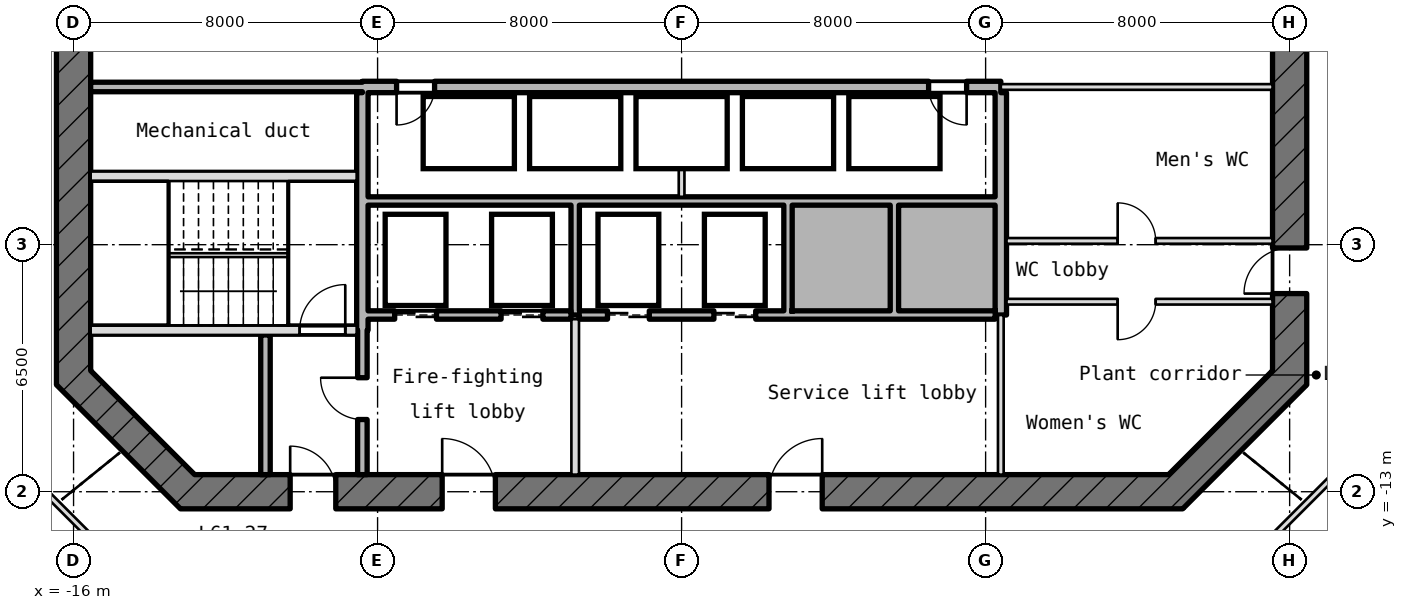
"""IFC4 building model, lengths in metres.
Left out: names, types, materials, properties, quantities, classifications, styles, units other than length and angle.
Written with IfcOpenShell. Run it as: python <this file> out.ifc"""

import sys

from ifc_helpers import new_model, si_unit, direction, frame, frame_2d, origin, place, context, subcontext, project, spatial, rectangle, extrude, element, fill, save


model = new_model("IFC4")
c1 = context("Model", 3, precision=1e-05, world=origin(), true_north=direction((0.0, 1.0)))
c2 = subcontext(c1, "Body", "Model", "MODEL_VIEW")
j1 = project(units=[si_unit("LENGTHUNIT", "METRE"), si_unit("PLANEANGLEUNIT", "RADIAN")], contexts=[c1])
p1 = place(None, origin())
s1 = spatial("IfcSite", under=j1, at=p1, CompositionType="ELEMENT")
p2 = place(p1, origin())
s2 = spatial("IfcBuilding", under=s1, at=p2, CompositionType="ELEMENT")
p3 = place(p2, frame((0.0, 0.0, 273.1)))
s3 = spatial("IfcBuildingStorey", under=s2, at=p3, CompositionType="ELEMENT", Elevation=273.1)
p4 = place(p3, frame((12.868, -13.132, -0.3), z_axis=(0.0, 0.0, 1.0), x_axis=(0.707106781187, 0.707106781187, 0.0)))
e1 = element("IfcWall", 1, at=p4, inside=s3, PredefinedType="SHEAR", context=c2, shape_type="SweptSolid", body=[
    extrude(rectangle(XDim=4.615, YDim=0.9, at=frame_2d((2.308, 0.0))), origin(), (0.0, 0.0, 1.0), 6.05),
])
p5 = place(p3, frame((16.0, -10.186, -0.3), z_axis=(0.0, 0.0, 1.0), x_axis=(0.0, 1.0, 0.0)))
e2 = element("IfcWall", 2, at=p5, inside=s3, PredefinedType="SHEAR", context=c2, shape_type="SweptSolid", body=[
    extrude(rectangle(XDim=20.373, YDim=0.9, at=frame_2d((10.186, 0.0))), origin(), (0.0, 0.0, 1.0), 6.05),
])
p6 = place(p5, frame((8.986, 0.0, 0.3)))
e3 = element("IfcOpeningElement", 3, at=p6, cuts=e2, PredefinedType="OPENING", context=c2, shape_type="SweptSolid", body=[
    extrude(rectangle(XDim=2.4, YDim=2.1, at=frame_2d((1.2, 1.05))), frame((0.0, 0.46, 0.0), z_axis=(0.0, -1.0, 0.0), x_axis=(1.0, 0.0, 0.0)), (0.0, 0.0, 1.0), 0.92),
])
p7 = place(p5, frame((13.586, 0.0, 0.3)))
e4 = element("IfcOpeningElement", 4, at=p7, cuts=e2, PredefinedType="OPENING", context=c2, shape_type="SweptSolid", body=[
    extrude(rectangle(XDim=1.2, YDim=2.1, at=frame_2d((0.6, 1.05))), frame((0.0, 0.46, 0.0), z_axis=(0.0, -1.0, 0.0), x_axis=(1.0, 0.0, 0.0)), (0.0, 0.0, 1.0), 0.92),
])
p8 = place(p5, frame((2.4, 0.0, 0.3)))
e5 = element("IfcOpeningElement", 5, at=p8, cuts=e2, PredefinedType="OPENING", context=c2, shape_type="SweptSolid", body=[
    extrude(rectangle(XDim=1.2, YDim=2.1, at=frame_2d((0.6, 1.05))), frame((0.0, 0.46, 0.0), z_axis=(0.0, -1.0, 0.0), x_axis=(1.0, 0.0, 0.0)), (0.0, 0.0, 1.0), 0.92),
])
p9 = place(p3, frame((-16.0, 10.186, -0.3), z_axis=(0.0, 0.0, 1.0), x_axis=(0.0, -1.0, 0.0)))
e6 = element("IfcWall", 6, at=p9, inside=s3, PredefinedType="SHEAR", context=c2, shape_type="SweptSolid", body=[
    extrude(rectangle(XDim=20.373, YDim=0.9, at=frame_2d((10.186, 0.0))), origin(), (0.0, 0.0, 1.0), 6.05),
])
p10 = place(p9, frame((8.986, 0.0, 0.3)))
e7 = element("IfcOpeningElement", 7, at=p10, cuts=e6, PredefinedType="OPENING", context=c2, shape_type="SweptSolid", body=[
    extrude(rectangle(XDim=2.4, YDim=2.1, at=frame_2d((1.2, 1.05))), frame((0.0, 0.46, 0.0), z_axis=(0.0, -1.0, 0.0), x_axis=(1.0, 0.0, 0.0)), (0.0, 0.0, 1.0), 0.92),
])
p11 = place(p9, frame((5.586, 0.0, 0.3)))
e8 = element("IfcOpeningElement", 8, at=p11, cuts=e6, PredefinedType="OPENING", context=c2, shape_type="SweptSolid", body=[
    extrude(rectangle(XDim=1.2, YDim=2.1, at=frame_2d((0.6, 1.05))), frame((0.0, 0.46, 0.0), z_axis=(0.0, -1.0, 0.0), x_axis=(1.0, 0.0, 0.0)), (0.0, 0.0, 1.0), 0.92),
])
p12 = place(p3, frame((-16.132, -9.868, -0.3), z_axis=(0.0, 0.0, 1.0), x_axis=(0.707106781187, -0.707106781187, 0.0)))
e9 = element("IfcWall", 9, at=p12, inside=s3, PredefinedType="SHEAR", context=c2, shape_type="SweptSolid", body=[
    extrude(rectangle(XDim=4.615, YDim=0.9, at=frame_2d((2.308, 0.0))), origin(), (0.0, 0.0, 1.0), 6.05),
])
p13 = place(p3, frame((-13.186, -13.0, -0.3), z_axis=(0.0, 0.0, 1.0), x_axis=(1.0, 0.0, 0.0)))
e10 = element("IfcWall", 10, at=p13, inside=s3, PredefinedType="SHEAR", context=c2, shape_type="SweptSolid", body=[
    extrude(rectangle(XDim=26.373, YDim=0.9, at=frame_2d((13.186, 0.0))), origin(), (0.0, 0.0, 1.0), 6.05),
])
p14 = place(p13, frame((2.886, 0.0, 0.3)))
e11 = element("IfcOpeningElement", 11, at=p14, cuts=e10, PredefinedType="OPENING", context=c2, shape_type="SweptSolid", body=[
    extrude(rectangle(XDim=1.2, YDim=2.1, at=frame_2d((0.6, 1.05))), frame((0.0, 0.46, 0.0), z_axis=(0.0, -1.0, 0.0), x_axis=(1.0, 0.0, 0.0)), (0.0, 0.0, 1.0), 0.92),
])
p15 = place(p13, frame((6.886, 0.0, 0.3)))
e12 = element("IfcOpeningElement", 12, at=p15, cuts=e10, PredefinedType="OPENING", context=c2, shape_type="SweptSolid", body=[
    extrude(rectangle(XDim=1.4, YDim=2.1, at=frame_2d((0.7, 1.05))), frame((0.0, 0.46, 0.0), z_axis=(0.0, -1.0, 0.0), x_axis=(1.0, 0.0, 0.0)), (0.0, 0.0, 1.0), 0.92),
])
p16 = place(p13, frame((15.486, 0.0, 0.3)))
e13 = element("IfcOpeningElement", 13, at=p16, cuts=e10, PredefinedType="OPENING", context=c2, shape_type="SweptSolid", body=[
    extrude(rectangle(XDim=1.4, YDim=2.1, at=frame_2d((0.7, 1.05))), frame((0.0, 0.46, 0.0), z_axis=(0.0, -1.0, 0.0), x_axis=(1.0, 0.0, 0.0)), (0.0, 0.0, 1.0), 0.92),
])
p17 = place(p3, frame((-15.55, -8.75, -0.3), z_axis=(0.0, 0.0, 1.0), x_axis=(1.0, 0.0, 0.0)))
e14 = element("IfcWall", 14, at=p17, inside=s3, PredefinedType="SHEAR", context=c2, shape_type="SweptSolid", body=[
    extrude(rectangle(XDim=7.0, YDim=0.25, at=frame_2d((3.5, 0.0))), origin(), (0.0, 0.0, 1.0), 6.05),
])
p18 = place(p17, frame((5.5, 0.0, 0.3)))
e15 = element("IfcOpeningElement", 15, at=p18, cuts=e14, PredefinedType="OPENING", context=c2, shape_type="SweptSolid", body=[
    extrude(rectangle(XDim=1.2, YDim=2.1, at=frame_2d((0.6, 1.05))), frame((0.0, 0.135, 0.0), z_axis=(0.0, -1.0, 0.0), x_axis=(1.0, 0.0, 0.0)), (0.0, 0.0, 1.0), 0.27),
])
p19 = place(p3, frame((-8.25, -8.35, 0.0), z_axis=(0.0, 0.0, 1.0), x_axis=(1.0, 0.0, 0.0)))
e16 = element("IfcWall", 16, at=p19, inside=s3, PredefinedType="STANDARD", context=c2, shape_type="SweptSolid", body=[
    extrude(rectangle(XDim=5.34, YDim=0.22, at=frame_2d((2.67, 0.0))), origin(), (0.0, 0.0, 1.0), 5.75),
])
p20 = place(p19, frame((0.7, 0.0, 0.0)))
e17 = element("IfcOpeningElement", 17, at=p20, cuts=e16, PredefinedType="OPENING", context=c2, shape_type="SweptSolid", body=[
    extrude(rectangle(XDim=1.1, YDim=2.1, at=frame_2d((0.55, 1.05))), frame((0.0, 0.12, 0.0), z_axis=(0.0, -1.0, 0.0), x_axis=(1.0, 0.0, 0.0)), (0.0, 0.0, 1.0), 0.24),
])
p21 = place(p19, frame((3.5, 0.0, 0.0)))
e18 = element("IfcOpeningElement", 18, at=p21, cuts=e16, PredefinedType="OPENING", context=c2, shape_type="SweptSolid", body=[
    extrude(rectangle(XDim=1.1, YDim=2.1, at=frame_2d((0.55, 1.05))), frame((0.0, 0.12, 0.0), z_axis=(0.0, -1.0, 0.0), x_axis=(1.0, 0.0, 0.0)), (0.0, 0.0, 1.0), 0.24),
])
p22 = place(p3, frame((-2.69, -8.35, 0.0), z_axis=(0.0, 0.0, 1.0), x_axis=(1.0, 0.0, 0.0)))
e19 = element("IfcWall", 19, at=p22, inside=s3, PredefinedType="STANDARD", context=c2, shape_type="SweptSolid", body=[
    extrude(rectangle(XDim=10.94, YDim=0.22, at=frame_2d((5.47, 0.0))), origin(), (0.0, 0.0, 1.0), 5.75),
])
p23 = place(p22, frame((0.74, 0.0, 0.0)))
e20 = element("IfcOpeningElement", 20, at=p23, cuts=e19, PredefinedType="OPENING", context=c2, shape_type="SweptSolid", body=[
    extrude(rectangle(XDim=1.1, YDim=2.1, at=frame_2d((0.55, 1.05))), frame((0.0, 0.12, 0.0), z_axis=(0.0, -1.0, 0.0), x_axis=(1.0, 0.0, 0.0)), (0.0, 0.0, 1.0), 0.24),
])
p24 = place(p22, frame((3.54, 0.0, 0.0)))
e21 = element("IfcOpeningElement", 21, at=p24, cuts=e19, PredefinedType="OPENING", context=c2, shape_type="SweptSolid", body=[
    extrude(rectangle(XDim=1.1, YDim=2.1, at=frame_2d((0.55, 1.05))), frame((0.0, 0.12, 0.0), z_axis=(0.0, -1.0, 0.0), x_axis=(1.0, 0.0, 0.0)), (0.0, 0.0, 1.0), 0.24),
])
p25 = place(p3, frame((8.55, -8.0, 0.0), z_axis=(0.0, 0.0, 1.0), x_axis=(1.0, 0.0, 0.0)))
e22 = element("IfcWall", 22, at=p25, inside=s3, PredefinedType="PARTITIONING", context=c2, shape_type="SweptSolid", body=[
    extrude(rectangle(XDim=7.0, YDim=0.15, at=frame_2d((3.5, 0.0))), origin(), (0.0, 0.0, 1.0), 5.75),
])
p26 = place(p25, frame((2.925, 0.0, 0.0)))
e23 = element("IfcOpeningElement", 23, at=p26, cuts=e22, PredefinedType="OPENING", context=c2, shape_type="SweptSolid", body=[
    extrude(rectangle(XDim=1.0, YDim=2.1, at=frame_2d((0.5, 1.05))), frame((0.0, 0.085, 0.0), z_axis=(0.0, -1.0, 0.0), x_axis=(1.0, 0.0, 0.0)), (0.0, 0.0, 1.0), 0.17),
])
p27 = place(p3, frame((8.55, -6.4, 0.0), z_axis=(0.0, 0.0, 1.0), x_axis=(1.0, 0.0, 0.0)))
e24 = element("IfcWall", 24, at=p27, inside=s3, PredefinedType="PARTITIONING", context=c2, shape_type="SweptSolid", body=[
    extrude(rectangle(XDim=7.0, YDim=0.15, at=frame_2d((3.5, 0.0))), origin(), (0.0, 0.0, 1.0), 5.75),
])
p28 = place(p27, frame((2.925, 0.0, 0.0)))
e25 = element("IfcOpeningElement", 25, at=p28, cuts=e24, PredefinedType="OPENING", context=c2, shape_type="SweptSolid", body=[
    extrude(rectangle(XDim=1.0, YDim=2.1, at=frame_2d((0.5, 1.05))), frame((0.0, 0.085, 0.0), z_axis=(0.0, -1.0, 0.0), x_axis=(1.0, 0.0, 0.0)), (0.0, 0.0, 1.0), 0.17),
])
p29 = place(p3, frame((-8.25, -5.35, 0.0), z_axis=(0.0, 0.0, 1.0), x_axis=(1.0, 0.0, 0.0)))
e26 = element("IfcWall", 26, at=p29, inside=s3, PredefinedType="STANDARD", context=c2, shape_type="SweptSolid", body=[
    extrude(rectangle(XDim=16.5, YDim=0.22, at=frame_2d((8.25, 0.0))), origin(), (0.0, 0.0, 1.0), 5.75),
])
p30 = place(p3, frame((-15.55, -4.7, -0.3), z_axis=(0.0, 0.0, 1.0), x_axis=(1.0, 0.0, 0.0)))
e27 = element("IfcWall", 27, at=p30, inside=s3, PredefinedType="SHEAR", context=c2, shape_type="SweptSolid", body=[
    extrude(rectangle(XDim=7.0, YDim=0.25, at=frame_2d((3.5, 0.0))), origin(), (0.0, 0.0, 1.0), 6.05),
])
p31 = place(p3, frame((-15.55, -2.35, 0.0), z_axis=(0.0, 0.0, 1.0), x_axis=(1.0, 0.0, 0.0)))
e28 = element("IfcWall", 28, at=p31, inside=s3, PredefinedType="STANDARD", context=c2, shape_type="SweptSolid", body=[
    extrude(rectangle(XDim=7.15, YDim=0.25, at=frame_2d((3.575, 0.0))), origin(), (0.0, 0.0, 1.0), 5.75),
])
p32 = place(p3, frame((-8.4, -2.35, -0.3), z_axis=(0.0, 0.0, 1.0), x_axis=(1.0, 0.0, 0.0)))
e29 = element("IfcWall", 29, at=p32, inside=s3, PredefinedType="SHEAR", context=c2, shape_type="SweptSolid", body=[
    extrude(rectangle(XDim=16.8, YDim=0.3, at=frame_2d((8.4, 0.0))), origin(), (0.0, 0.0, 1.0), 6.05),
])
p33 = place(p32, frame((0.9, 0.0, 0.3)))
e30 = element("IfcOpeningElement", 30, at=p33, cuts=e29, PredefinedType="OPENING", context=c2, shape_type="SweptSolid", body=[
    extrude(rectangle(XDim=1.0, YDim=2.1, at=frame_2d((0.5, 1.05))), frame((0.0, 0.16, 0.0), z_axis=(0.0, -1.0, 0.0), x_axis=(1.0, 0.0, 0.0)), (0.0, 0.0, 1.0), 0.32),
])
p34 = place(p32, frame((14.9, 0.0, 0.3)))
e31 = element("IfcOpeningElement", 31, at=p34, cuts=e29, PredefinedType="OPENING", context=c2, shape_type="SweptSolid", body=[
    extrude(rectangle(XDim=1.0, YDim=2.1, at=frame_2d((0.5, 1.05))), frame((0.0, 0.16, 0.0), z_axis=(0.0, -1.0, 0.0), x_axis=(1.0, 0.0, 0.0)), (0.0, 0.0, 1.0), 0.32),
])
p35 = place(p3, frame((8.4, -2.35, 0.0), z_axis=(0.0, 0.0, 1.0), x_axis=(1.0, 0.0, 0.0)))
e32 = element("IfcWall", 32, at=p35, inside=s3, PredefinedType="PARTITIONING", context=c2, shape_type="SweptSolid", body=[
    extrude(rectangle(XDim=7.15, YDim=0.15, at=frame_2d((3.575, 0.0))), origin(), (0.0, 0.0, 1.0), 5.75),
])
p36 = place(p3, frame((-10.95, -12.55, 0.0), z_axis=(0.0, 0.0, 1.0), x_axis=(0.0, 1.0, 0.0)))
e33 = element("IfcWall", 33, at=p36, inside=s3, PredefinedType="STANDARD", context=c2, shape_type="SweptSolid", body=[
    extrude(rectangle(XDim=3.675, YDim=0.25, at=frame_2d((1.837, 0.0))), origin(), (0.0, 0.0, 1.0), 5.75),
])
p37 = place(p3, frame((-8.4, -12.55, 0.0), z_axis=(0.0, 0.0, 1.0), x_axis=(0.0, 1.0, 0.0)))
e34 = element("IfcWall", 34, at=p37, inside=s3, PredefinedType="STANDARD", context=c2, shape_type="SweptSolid", body=[
    extrude(rectangle(XDim=3.8, YDim=0.25, at=frame_2d((1.9, 0.0))), origin(), (0.0, 0.0, 1.0), 5.75),
])
p38 = place(p37, frame((1.45, 0.0, 0.0)))
e35 = element("IfcOpeningElement", 35, at=p38, cuts=e34, PredefinedType="OPENING", context=c2, shape_type="SweptSolid", body=[
    extrude(rectangle(XDim=1.1, YDim=2.1, at=frame_2d((0.55, 1.05))), frame((0.0, 0.135, 0.0), z_axis=(0.0, -1.0, 0.0), x_axis=(1.0, 0.0, 0.0)), (0.0, 0.0, 1.0), 0.27),
])
p39 = place(p3, frame((-8.4, -8.75, -0.3), z_axis=(0.0, 0.0, 1.0), x_axis=(0.0, 1.0, 0.0)))
e36 = element("IfcWall", 36, at=p39, inside=s3, PredefinedType="SHEAR", context=c2, shape_type="SweptSolid", body=[
    extrude(rectangle(XDim=6.25, YDim=0.3, at=frame_2d((3.125, 0.0))), origin(), (0.0, 0.0, 1.0), 6.05),
])
p40 = place(p3, frame((-2.8, -12.55, 0.0), z_axis=(0.0, 0.0, 1.0), x_axis=(0.0, 1.0, 0.0)))
e37 = element("IfcWall", 37, at=p40, inside=s3, PredefinedType="PARTITIONING", context=c2, shape_type="SweptSolid", body=[
    extrude(rectangle(XDim=4.09, YDim=0.2, at=frame_2d((2.045, 0.0))), origin(), (0.0, 0.0, 1.0), 5.75),
])
p41 = place(p3, frame((-2.8, -8.35, 0.0), z_axis=(0.0, 0.0, 1.0), x_axis=(0.0, 1.0, 0.0)))
e38 = element("IfcWall", 38, at=p41, inside=s3, PredefinedType="STANDARD", context=c2, shape_type="SweptSolid", body=[
    extrude(rectangle(XDim=2.89, YDim=0.22, at=frame_2d((1.445, 0.0))), origin(), (0.0, 0.0, 1.0), 5.75),
])
p42 = place(p3, frame((0.0, -5.24, 0.0), z_axis=(0.0, 0.0, 1.0), x_axis=(0.0, 1.0, 0.0)))
e39 = element("IfcWall", 39, at=p42, inside=s3, PredefinedType="PARTITIONING", context=c2, shape_type="SweptSolid", body=[
    extrude(rectangle(XDim=2.74, YDim=0.15, at=frame_2d((1.37, 0.0))), origin(), (0.0, 0.0, 1.0), 5.75),
])
for number, where, z_axis, x_axis in (
    (40, (2.8, -8.24, 0.0), (0.0, 0.0, 1.0), (0.0, 1.0, 0.0)),
    (41, (5.6, -8.24, 0.0), (0.0, 0.0, 1.0), (0.0, 1.0, 0.0)),
):
    element("IfcWall", number, at=place(p3, frame(where, z_axis=z_axis, x_axis=x_axis)), inside=s3, PredefinedType="STANDARD", context=c2, shape_type="SweptSolid", body=[
        extrude(rectangle(XDim=2.78, YDim=0.22, at=frame_2d((1.39, 0.0))), origin(), (0.0, 0.0, 1.0), 5.75),
    ])
p43 = place(p3, frame((8.4, -12.55, 0.0), z_axis=(0.0, 0.0, 1.0), x_axis=(0.0, 1.0, 0.0)))
e42 = element("IfcWall", 42, at=p43, inside=s3, PredefinedType="PARTITIONING", context=c2, shape_type="SweptSolid", body=[
    extrude(rectangle(XDim=4.2, YDim=0.15, at=frame_2d((2.1, 0.0))), origin(), (0.0, 0.0, 1.0), 5.75),
])
p44 = place(p3, frame((8.4, -8.35, -0.3), z_axis=(0.0, 0.0, 1.0), x_axis=(0.0, 1.0, 0.0)))
e43 = element("IfcWall", 43, at=p44, inside=s3, PredefinedType="SHEAR", context=c2, shape_type="SweptSolid", body=[
    extrude(rectangle(XDim=5.85, YDim=0.3, at=frame_2d((2.925, 0.0))), origin(), (0.0, 0.0, 1.0), 6.05),
])
p45 = place(p3, frame((14.161, -16.824, 0.0), z_axis=(0.0, 0.0, 1.0), x_axis=(0.769037255877, 0.639203957336, 0.0)))
e44 = element("IfcWall", 44, at=p45, inside=s3, PredefinedType="STANDARD", context=c2, shape_type="SweptSolid", body=[
    extrude(rectangle(XDim=7.621, YDim=0.3, at=frame_2d((3.811, 0.0))), origin(), (0.0, 0.0, 1.0), 5.75),
])
p46 = place(p3, frame((-15.493, -16.382, 0.0), z_axis=(0.0, 0.0, 1.0), x_axis=(-0.769038321176, 0.639202675653, 0.0)))
e45 = element("IfcWall", 45, at=p46, inside=s3, PredefinedType="STANDARD", context=c2, shape_type="SweptSolid", body=[
    extrude(rectangle(XDim=6.363, YDim=0.3, at=frame_2d((3.182, 0.0))), origin(), (0.0, 0.0, 1.0), 5.75),
])
p47 = place(p3, frame((14.098, -15.65, 0.0), z_axis=(0.0, 0.0, 1.0), x_axis=(0.707106781187, 0.707106781187, 0.0)))
e46 = element("IfcWall", 46, at=p47, inside=s3, PredefinedType="PARTITIONING", context=c2, shape_type="SweptSolid", body=[
    extrude(rectangle(XDim=6.406, YDim=0.15, at=frame_2d((3.203, 0.0))), origin(), (0.0, 0.0, 1.0), 5.75),
])
p48 = place(p3, frame((-14.459, -15.289, 0.0), z_axis=(0.0, 0.0, 1.0), x_axis=(-0.707086184144, 0.707127377629, 0.0)))
e47 = element("IfcWall", 47, at=p48, inside=s3, PredefinedType="PARTITIONING", context=c2, shape_type="SweptSolid", body=[
    extrude(rectangle(XDim=5.927, YDim=0.15, at=frame_2d((2.963, 0.0))), origin(), (0.0, 0.0, 1.0), 5.75),
])
p49 = place(p20, origin())
e48 = element("IfcDoor", 48, at=p49, inside=s3, OperationType="DOUBLE_DOOR_SLIDING", PredefinedType="DOOR", context=c2, shape_type="SweptSolid", body=[
    extrude(rectangle(XDim=1.1, YDim=2.1, at=frame_2d((0.55, 1.05))), frame((0.0, 0.025, 0.0), z_axis=(0.0, -1.0, 0.0), x_axis=(1.0, 0.0, 0.0)), (0.0, 0.0, 1.0), 0.05),
])
fill(e17, e48)
p50 = place(p21, origin())
e49 = element("IfcDoor", 49, at=p50, inside=s3, OperationType="DOUBLE_DOOR_SLIDING", PredefinedType="DOOR", context=c2, shape_type="SweptSolid", body=[
    extrude(rectangle(XDim=1.1, YDim=2.1, at=frame_2d((0.55, 1.05))), frame((0.0, 0.025, 0.0), z_axis=(0.0, -1.0, 0.0), x_axis=(1.0, 0.0, 0.0)), (0.0, 0.0, 1.0), 0.05),
])
fill(e18, e49)
p51 = place(p23, origin())
e50 = element("IfcDoor", 50, at=p51, inside=s3, OperationType="DOUBLE_DOOR_SLIDING", PredefinedType="DOOR", context=c2, shape_type="SweptSolid", body=[
    extrude(rectangle(XDim=1.1, YDim=2.1, at=frame_2d((0.55, 1.05))), frame((0.0, 0.025, 0.0), z_axis=(0.0, -1.0, 0.0), x_axis=(1.0, 0.0, 0.0)), (0.0, 0.0, 1.0), 0.05),
])
fill(e20, e50)
p52 = place(p24, origin())
e51 = element("IfcDoor", 51, at=p52, inside=s3, OperationType="DOUBLE_DOOR_SLIDING", PredefinedType="DOOR", context=c2, shape_type="SweptSolid", body=[
    extrude(rectangle(XDim=1.1, YDim=2.1, at=frame_2d((0.55, 1.05))), frame((0.0, 0.025, 0.0), z_axis=(0.0, -1.0, 0.0), x_axis=(1.0, 0.0, 0.0)), (0.0, 0.0, 1.0), 0.05),
])
fill(e21, e51)
p53 = place(p18, origin())
e52 = element("IfcDoor", 52, at=p53, inside=s3, OperationType="SINGLE_SWING_RIGHT", PredefinedType="DOOR", context=c2, shape_type="SweptSolid", body=[
    extrude(rectangle(XDim=1.2, YDim=2.1, at=frame_2d((0.6, 1.05))), frame((0.0, 0.025, 0.0), z_axis=(0.0, -1.0, 0.0), x_axis=(1.0, 0.0, 0.0)), (0.0, 0.0, 1.0), 0.05),
])
fill(e15, e52)
p54 = place(p38, origin())
e53 = element("IfcDoor", 53, at=p54, inside=s3, OperationType="SINGLE_SWING_RIGHT", PredefinedType="DOOR", context=c2, shape_type="SweptSolid", body=[
    extrude(rectangle(XDim=1.1, YDim=2.1, at=frame_2d((0.55, 1.05))), frame((0.0, 0.025, 0.0), z_axis=(0.0, -1.0, 0.0), x_axis=(1.0, 0.0, 0.0)), (0.0, 0.0, 1.0), 0.05),
])
fill(e35, e53)
p55 = place(p14, origin())
e54 = element("IfcDoor", 54, at=p55, inside=s3, OperationType="SINGLE_SWING_RIGHT", PredefinedType="DOOR", context=c2, shape_type="SweptSolid", body=[
    extrude(rectangle(XDim=1.2, YDim=2.1, at=frame_2d((0.6, 1.05))), frame((0.0, 0.025, 0.0), z_axis=(0.0, -1.0, 0.0), x_axis=(1.0, 0.0, 0.0)), (0.0, 0.0, 1.0), 0.05),
])
fill(e11, e54)
p56 = place(p15, origin())
e55 = element("IfcDoor", 55, at=p56, inside=s3, OperationType="SINGLE_SWING_RIGHT", PredefinedType="DOOR", context=c2, shape_type="SweptSolid", body=[
    extrude(rectangle(XDim=1.4, YDim=2.1, at=frame_2d((0.7, 1.05))), frame((0.0, 0.025, 0.0), z_axis=(0.0, -1.0, 0.0), x_axis=(1.0, 0.0, 0.0)), (0.0, 0.0, 1.0), 0.05),
])
fill(e12, e55)
p57 = place(p16, origin())
e56 = element("IfcDoor", 56, at=p57, inside=s3, OperationType="SINGLE_SWING_RIGHT", PredefinedType="DOOR", context=c2, shape_type="SweptSolid", body=[
    extrude(rectangle(XDim=1.4, YDim=2.1, at=frame_2d((0.7, 1.05))), frame((0.0, 0.025, 0.0), z_axis=(0.0, -1.0, 0.0), x_axis=(1.0, 0.0, 0.0)), (0.0, 0.0, 1.0), 0.05),
])
fill(e13, e56)
p58 = place(p33, frame((1.0, 0.0, 0.0), z_axis=(0.0, 0.0, 1.0), x_axis=(-1.0, 0.0, 0.0)))
e57 = element("IfcDoor", 57, at=p58, inside=s3, OperationType="SINGLE_SWING_LEFT", PredefinedType="DOOR", context=c2, shape_type="SweptSolid", body=[
    extrude(rectangle(XDim=1.0, YDim=2.1, at=frame_2d((0.5, 1.05))), frame((0.0, 0.025, 0.0), z_axis=(0.0, -1.0, 0.0), x_axis=(1.0, 0.0, 0.0)), (0.0, 0.0, 1.0), 0.05),
])
fill(e30, e57)
p59 = place(p34, frame((1.0, 0.0, 0.0), z_axis=(0.0, 0.0, 1.0), x_axis=(-1.0, 0.0, 0.0)))
e58 = element("IfcDoor", 58, at=p59, inside=s3, OperationType="SINGLE_SWING_LEFT", PredefinedType="DOOR", context=c2, shape_type="SweptSolid", body=[
    extrude(rectangle(XDim=1.0, YDim=2.1, at=frame_2d((0.5, 1.05))), frame((0.0, 0.025, 0.0), z_axis=(0.0, -1.0, 0.0), x_axis=(1.0, 0.0, 0.0)), (0.0, 0.0, 1.0), 0.05),
])
fill(e31, e58)
p60 = place(p28, origin())
e59 = element("IfcDoor", 59, at=p60, inside=s3, OperationType="SINGLE_SWING_RIGHT", PredefinedType="DOOR", context=c2, shape_type="SweptSolid", body=[
    extrude(rectangle(XDim=1.0, YDim=2.1, at=frame_2d((0.5, 1.05))), frame((0.0, 0.025, 0.0), z_axis=(0.0, -1.0, 0.0), x_axis=(1.0, 0.0, 0.0)), (0.0, 0.0, 1.0), 0.05),
])
fill(e25, e59)
p61 = place(p8, origin())
e60 = element("IfcDoor", 60, at=p61, inside=s3, OperationType="SINGLE_SWING_RIGHT", PredefinedType="DOOR", context=c2, shape_type="SweptSolid", body=[
    extrude(rectangle(XDim=1.2, YDim=2.1, at=frame_2d((0.6, 1.05))), frame((0.0, 0.025, 0.0), z_axis=(0.0, -1.0, 0.0), x_axis=(1.0, 0.0, 0.0)), (0.0, 0.0, 1.0), 0.05),
])
fill(e5, e60)
p62 = place(p26, frame((1.0, 0.0, 0.0), z_axis=(0.0, 0.0, 1.0), x_axis=(-1.0, 0.0, 0.0)))
e61 = element("IfcDoor", 61, at=p62, inside=s3, OperationType="SINGLE_SWING_LEFT", PredefinedType="DOOR", context=c2, shape_type="SweptSolid", body=[
    extrude(rectangle(XDim=1.0, YDim=2.1, at=frame_2d((0.5, 1.05))), frame((0.0, 0.025, 0.0), z_axis=(0.0, -1.0, 0.0), x_axis=(1.0, 0.0, 0.0)), (0.0, 0.0, 1.0), 0.05),
])
fill(e23, e61)
save(model, sys.argv[1])
